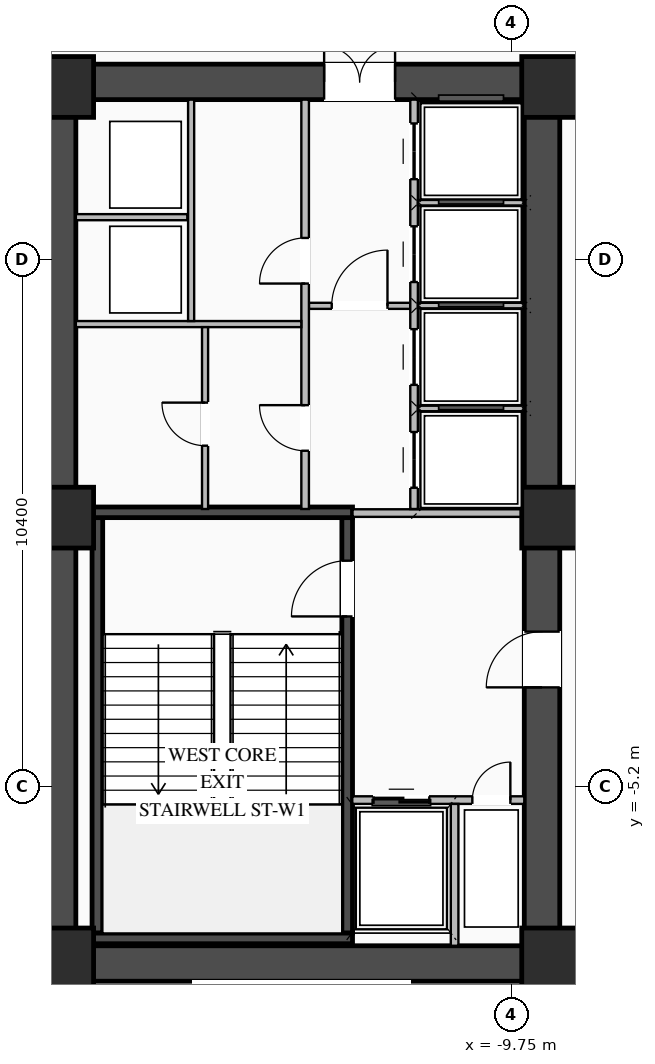
"""IFC4 building model, lengths in metres.
Left out: names, types, materials, properties, quantities, classifications, styles, units other than length and angle.
Written with IfcOpenShell. Run it as: python <this file> out.ifc"""

import sys

from ifc_helpers import new_model, si_unit, direction, frame, frame_2d, origin, origin_2d, place, context, subcontext, project, spatial, rectangle, extrude, element, fill, save


model = new_model("IFC4")
c1 = context("Model", 3, precision=1e-05, world=origin(), true_north=direction((0.0, 1.0)))
c2 = subcontext(c1, "Body", "Model", "MODEL_VIEW")
j1 = project(units=[si_unit("LENGTHUNIT", "METRE"), si_unit("PLANEANGLEUNIT", "RADIAN")], contexts=[c1])
p1 = place(None, origin())
s1 = spatial("IfcSite", under=j1, at=p1, CompositionType="ELEMENT")
p2 = place(p1, origin())
s2 = spatial("IfcBuilding", under=s1, at=p2, CompositionType="ELEMENT")
p3 = place(p2, frame((0.0, 0.0, -4.8)))
s3 = spatial("IfcBuildingStorey", under=s2, at=p3, CompositionType="ELEMENT", Elevation=-4.8)
p4 = place(p3, frame((-19.05, -8.7, 0.0), z_axis=(0.0, 0.0, 1.0), x_axis=(1.0, 0.0, 0.0)))
e1 = element("IfcWall", 1, at=p4, inside=s3, PredefinedType="SHEAR", context=c2, shape_type="SweptSolid", body=[
    extrude(rectangle(XDim=10.25, YDim=0.7, at=frame_2d((5.125, 0.0))), origin(), (0.0, 0.0, 1.0), 4.45),
])
p5 = place(p3, frame((-19.05, 8.7, 0.0), z_axis=(0.0, 0.0, 1.0), x_axis=(1.0, 0.0, 0.0)))
e2 = element("IfcWall", 2, at=p5, inside=s3, PredefinedType="SHEAR", context=c2, shape_type="SweptSolid", body=[
    extrude(rectangle(XDim=10.25, YDim=0.7, at=frame_2d((5.125, 0.0))), origin(), (0.0, 0.0, 1.0), 4.45),
])
p6 = place(p5, frame((5.6, 0.0, 0.0)))
e3 = element("IfcOpeningElement", 3, at=p6, cuts=e2, PredefinedType="OPENING", context=c2, shape_type="SweptSolid", body=[
    extrude(rectangle(XDim=1.4, YDim=2.05, at=frame_2d((0.7, 1.025))), frame((0.0, 0.36, 0.0), z_axis=(0.0, -1.0, 0.0), x_axis=(1.0, 0.0, 0.0)), (0.0, 0.0, 1.0), 0.72),
])
p7 = place(p3, frame((-18.7, -8.35, 0.0), z_axis=(0.0, 0.0, 1.0), x_axis=(0.0, 1.0, 0.0)))
e4 = element("IfcWall", 4, at=p7, inside=s3, PredefinedType="SHEAR", context=c2, shape_type="SweptSolid", body=[
    extrude(rectangle(XDim=16.7, YDim=0.7, at=frame_2d((8.35, 0.0))), origin(), (0.0, 0.0, 1.0), 4.45),
])
p8 = place(p3, frame((-9.15, -8.35, 0.0), z_axis=(0.0, 0.0, 1.0), x_axis=(0.0, 1.0, 0.0)))
e5 = element("IfcWall", 5, at=p8, inside=s3, PredefinedType="SHEAR", context=c2, shape_type="SweptSolid", body=[
    extrude(rectangle(XDim=16.7, YDim=0.7, at=frame_2d((8.35, 0.0))), origin(), (0.0, 0.0, 1.0), 4.45),
])
p9 = place(p8, frame((5.1, 0.0, 0.0)))
e6 = element("IfcOpeningElement", 6, at=p9, cuts=e5, PredefinedType="OPENING", context=c2, shape_type="SweptSolid", body=[
    extrude(rectangle(XDim=1.1, YDim=2.08, at=frame_2d((0.55, 1.04))), frame((0.0, 0.36, 0.0), z_axis=(0.0, -1.0, 0.0), x_axis=(1.0, 0.0, 0.0)), (0.0, 0.0, 1.0), 0.72),
])
p10 = place(p3, frame((-12.995, -8.1, 0.0), z_axis=(0.0, 0.0, 1.0), x_axis=(0.0, 1.0, 0.0)))
e7 = element("IfcWall", 7, at=p10, inside=s3, PredefinedType="SHEAR", context=c2, shape_type="SweptSolid", body=[
    extrude(rectangle(XDim=8.2, YDim=0.21, at=frame_2d((4.1, 0.0))), origin(), (0.0, 0.0, 1.0), 4.45),
])
p11 = place(p10, frame((6.25, 0.0, 0.0)))
e8 = element("IfcOpeningElement", 8, at=p11, cuts=e7, PredefinedType="OPENING", context=c2, shape_type="SweptSolid", body=[
    extrude(rectangle(XDim=1.1, YDim=2.15, at=frame_2d((0.55, 1.075))), frame((0.0, 0.115, 0.0), z_axis=(0.0, -1.0, 0.0), x_axis=(1.0, 0.0, 0.0)), (0.0, 0.0, 1.0), 0.23),
])
p12 = place(p3, frame((-17.925, -8.1, 0.0), z_axis=(0.0, 0.0, 1.0), x_axis=(0.0, 1.0, 0.0)))
e9 = element("IfcWall", 9, at=p12, inside=s3, PredefinedType="SHEAR", context=c2, shape_type="SweptSolid", body=[
    extrude(rectangle(XDim=8.2, YDim=0.21, at=frame_2d((4.1, 0.0))), origin(), (0.0, 0.0, 1.0), 4.45),
])
for number, where, z_axis, x_axis in (
    (10, (-18.03, -8.205, 0.0), (0.0, 0.0, 1.0), (1.0, 0.0, 0.0)),
    (11, (-12.89, 0.205, 0.0), (0.0, 0.0, 1.0), (-1.0, 0.0, 0.0)),
):
    element("IfcWall", number, at=place(p3, frame(where, z_axis=z_axis, x_axis=x_axis)), inside=s3, PredefinedType="SHEAR", context=c2, shape_type="SweptSolid", body=[
        extrude(rectangle(XDim=5.14, YDim=0.21, at=frame_2d((2.57, 0.0))), origin(), (0.0, 0.0, 1.0), 4.45),
    ])
for number, where, z_axis, x_axis in (
    (12, (-8.95, -8.6, 0.0), (0.0, 0.0, 1.0), (1.0, 0.0, 0.0)),
    (13, (-8.95, 0.1, 0.0), (0.0, 0.0, 1.0), (1.0, 0.0, 0.0)),
    (14, (-8.95, 8.6, 0.0), (0.0, 0.0, 1.0), (1.0, 0.0, 0.0)),
    (15, (-18.6, -8.6, 0.0), (0.0, 0.0, 1.0), (1.0, 0.0, 0.0)),
    (16, (-18.6, 0.1, 0.0), (0.0, 0.0, 1.0), (1.0, 0.0, 0.0)),
    (17, (-18.6, 8.6, 0.0), (0.0, 0.0, 1.0), (1.0, 0.0, 0.0)),
):
    element("IfcColumn", number, at=place(p3, frame(where, z_axis=z_axis, x_axis=x_axis)), inside=s3, PredefinedType="COLUMN", context=c2, shape_type="SweptSolid", body=[
        extrude(rectangle(XDim=1.2, YDim=1.2, at=origin_2d()), origin(), (0.0, 0.0, 1.0), 4.8),
    ])
p13 = place(p3, frame((-12.895, -5.475, 0.0), z_axis=(0.0, 0.0, 1.0), x_axis=(1.0, 0.0, 0.0)))
e18 = element("IfcWall", 18, at=p13, inside=s3, PredefinedType="STANDARD", context=c2, shape_type="SweptSolid", body=[
    extrude(rectangle(XDim=3.395, YDim=0.15, at=frame_2d((1.698, 0.0))), origin(), (0.0, 0.0, 1.0), 4.43),
])
p14 = place(p13, frame((0.42, 0.0, 0.0)))
e19 = element("IfcOpeningElement", 19, at=p14, cuts=e18, PredefinedType="OPENING", context=c2, shape_type="SweptSolid", body=[
    extrude(rectangle(XDim=1.1, YDim=2.15, at=frame_2d((0.55, 1.075))), frame((0.0, 0.085, 0.0), z_axis=(0.0, -1.0, 0.0), x_axis=(1.0, 0.0, 0.0)), (0.0, 0.0, 1.0), 0.17),
])
p15 = place(p13, frame((2.37, 0.0, 0.0)))
e20 = element("IfcOpeningElement", 20, at=p15, cuts=e18, PredefinedType="OPENING", context=c2, shape_type="SweptSolid", body=[
    extrude(rectangle(XDim=0.75, YDim=2.05, at=frame_2d((0.375, 1.025))), frame((0.0, 0.085, 0.0), z_axis=(0.0, -1.0, 0.0), x_axis=(1.0, 0.0, 0.0)), (0.0, 0.0, 1.0), 0.17),
])
p16 = place(p3, frame((-10.875, -8.35, 0.0), z_axis=(0.0, 0.0, 1.0), x_axis=(0.0, 1.0, 0.0)))
e21 = element("IfcWall", 21, at=p16, inside=s3, PredefinedType="STANDARD", context=c2, shape_type="SweptSolid", body=[
    extrude(rectangle(XDim=2.8, YDim=0.15, at=frame_2d((1.4, 0.0))), origin(), (0.0, 0.0, 1.0), 4.43),
])
p17 = place(p3, frame((-12.89, 0.19, 0.0), z_axis=(0.0, 0.0, 1.0), x_axis=(1.0, 0.0, 0.0)))
e22 = element("IfcWall", 22, at=p17, inside=s3, PredefinedType="STANDARD", context=c2, shape_type="SweptSolid", body=[
    extrude(rectangle(XDim=3.39, YDim=0.15, at=frame_2d((1.695, 0.0))), origin(), (0.0, 0.0, 1.0), 3.625),
])
p18 = place(p3, frame((-13.75, 4.28, 0.0), z_axis=(0.0, 0.0, 1.0), x_axis=(1.0, 0.0, 0.0)))
e23 = element("IfcWall", 23, at=p18, inside=s3, PredefinedType="STANDARD", context=c2, shape_type="SweptSolid", body=[
    extrude(rectangle(XDim=2.0, YDim=0.12, at=frame_2d((1.0, 0.0))), origin(), (0.0, 0.0, 1.0), 4.43),
])
p19 = place(p18, frame((0.45, 0.0, 0.0)))
e24 = element("IfcOpeningElement", 24, at=p19, cuts=e23, PredefinedType="OPENING", context=c2, shape_type="SweptSolid", body=[
    extrude(rectangle(XDim=1.1, YDim=2.1, at=frame_2d((0.55, 1.05))), frame((0.0, 0.07, 0.0), z_axis=(0.0, -1.0, 0.0), x_axis=(1.0, 0.0, 0.0)), (0.0, 0.0, 1.0), 0.14),
])
p20 = place(p3, frame((-11.675, 0.27, 0.0), z_axis=(0.0, 0.0, 1.0), x_axis=(0.0, 1.0, 0.0)))
e25 = element("IfcWall", 25, at=p20, inside=s3, PredefinedType="STANDARD", context=c2, shape_type="SweptSolid", body=[
    extrude(rectangle(XDim=8.08, YDim=0.15, at=frame_2d((4.04, 0.0))), origin(), (0.0, 0.0, 1.0), 4.43),
])
p21 = place(p20, frame((0.42, 0.0, 0.0)))
e26 = element("IfcOpeningElement", 26, at=p21, cuts=e25, PredefinedType="OPENING", context=c2, shape_type="SweptSolid", body=[
    extrude(rectangle(XDim=1.1, YDim=2.1, at=frame_2d((0.55, 1.05))), frame((0.0, 0.085, 0.0), z_axis=(0.0, -1.0, 0.0), x_axis=(1.0, 0.0, 0.0)), (0.0, 0.0, 1.0), 0.17),
])
p22 = place(p20, frame((2.45, 0.0, 0.0)))
e27 = element("IfcOpeningElement", 27, at=p22, cuts=e25, PredefinedType="OPENING", context=c2, shape_type="SweptSolid", body=[
    extrude(rectangle(XDim=1.1, YDim=2.1, at=frame_2d((0.55, 1.05))), frame((0.0, 0.085, 0.0), z_axis=(0.0, -1.0, 0.0), x_axis=(1.0, 0.0, 0.0)), (0.0, 0.0, 1.0), 0.17),
])
p23 = place(p20, frame((4.48, 0.0, 0.0)))
e28 = element("IfcOpeningElement", 28, at=p23, cuts=e25, PredefinedType="OPENING", context=c2, shape_type="SweptSolid", body=[
    extrude(rectangle(XDim=1.1, YDim=2.1, at=frame_2d((0.55, 1.05))), frame((0.0, 0.085, 0.0), z_axis=(0.0, -1.0, 0.0), x_axis=(1.0, 0.0, 0.0)), (0.0, 0.0, 1.0), 0.17),
])
p24 = place(p20, frame((6.51, 0.0, 0.0)))
e29 = element("IfcOpeningElement", 29, at=p24, cuts=e25, PredefinedType="OPENING", context=c2, shape_type="SweptSolid", body=[
    extrude(rectangle(XDim=1.1, YDim=2.1, at=frame_2d((0.55, 1.05))), frame((0.0, 0.085, 0.0), z_axis=(0.0, -1.0, 0.0), x_axis=(1.0, 0.0, 0.0)), (0.0, 0.0, 1.0), 0.17),
])
for number, where, z_axis, x_axis in (
    (30, (-11.6, 2.255, 0.0), (0.0, 0.0, 1.0), (1.0, 0.0, 0.0)),
    (31, (-11.6, 4.285, 0.0), (0.0, 0.0, 1.0), (1.0, 0.0, 0.0)),
    (32, (-11.6, 6.315, 0.0), (0.0, 0.0, 1.0), (1.0, 0.0, 0.0)),
):
    element("IfcWall", number, at=place(p3, frame(where, z_axis=z_axis, x_axis=x_axis)), inside=s3, PredefinedType="STANDARD", context=c2, shape_type="SweptSolid", body=[
        extrude(rectangle(XDim=2.1, YDim=0.11, at=frame_2d((1.05, 0.0))), origin(), (0.0, 0.0, 1.0), 4.43),
    ])
p25 = place(p3, frame((-13.825, 0.27, 0.0), z_axis=(0.0, 0.0, 1.0), x_axis=(0.0, 1.0, 0.0)))
e33 = element("IfcWall", 33, at=p25, inside=s3, PredefinedType="STANDARD", context=c2, shape_type="SweptSolid", body=[
    extrude(rectangle(XDim=8.08, YDim=0.15, at=frame_2d((4.04, 0.0))), origin(), (0.0, 0.0, 1.0), 4.43),
])
p26 = place(p25, frame((4.45, 0.0, 0.0)))
e34 = element("IfcOpeningElement", 34, at=p26, cuts=e33, PredefinedType="OPENING", context=c2, shape_type="SweptSolid", body=[
    extrude(rectangle(XDim=0.9, YDim=2.05, at=frame_2d((0.45, 1.025))), frame((0.0, 0.085, 0.0), z_axis=(0.0, -1.0, 0.0), x_axis=(1.0, 0.0, 0.0)), (0.0, 0.0, 1.0), 0.17),
])
p27 = place(p25, frame((1.15, 0.0, 0.0)))
e35 = element("IfcOpeningElement", 35, at=p27, cuts=e33, PredefinedType="OPENING", context=c2, shape_type="SweptSolid", body=[
    extrude(rectangle(XDim=0.9, YDim=2.05, at=frame_2d((0.45, 1.025))), frame((0.0, 0.085, 0.0), z_axis=(0.0, -1.0, 0.0), x_axis=(1.0, 0.0, 0.0)), (0.0, 0.0, 1.0), 0.17),
])
p28 = place(p3, frame((-18.35, 3.92, 0.0), z_axis=(0.0, 0.0, 1.0), x_axis=(1.0, 0.0, 0.0)))
e36 = element("IfcWall", 36, at=p28, inside=s3, PredefinedType="STANDARD", context=c2, shape_type="SweptSolid", body=[
    extrude(rectangle(XDim=4.45, YDim=0.12, at=frame_2d((2.225, 0.0))), origin(), (0.0, 0.0, 1.0), 4.43),
])
p29 = place(p3, frame((-18.35, 6.03, 0.0), z_axis=(0.0, 0.0, 1.0), x_axis=(1.0, 0.0, 0.0)))
e37 = element("IfcWall", 37, at=p29, inside=s3, PredefinedType="STANDARD", context=c2, shape_type="SweptSolid", body=[
    extrude(rectangle(XDim=2.2, YDim=0.12, at=frame_2d((1.1, 0.0))), origin(), (0.0, 0.0, 1.0), 4.43),
])
p30 = place(p3, frame((-16.075, 3.98, 0.0), z_axis=(0.0, 0.0, 1.0), x_axis=(0.0, 1.0, 0.0)))
e38 = element("IfcWall", 38, at=p30, inside=s3, PredefinedType="STANDARD", context=c2, shape_type="SweptSolid", body=[
    extrude(rectangle(XDim=4.37, YDim=0.12, at=frame_2d((2.185, 0.0))), origin(), (0.0, 0.0, 1.0), 4.43),
])
p31 = place(p3, frame((-15.8, 0.27, 0.0), z_axis=(0.0, 0.0, 1.0), x_axis=(0.0, 1.0, 0.0)))
e39 = element("IfcWall", 39, at=p31, inside=s3, PredefinedType="STANDARD", context=c2, shape_type="SweptSolid", body=[
    extrude(rectangle(XDim=3.59, YDim=0.12, at=frame_2d((1.795, 0.0))), origin(), (0.0, 0.0, 1.0), 4.43),
])
p32 = place(p31, frame((1.25, 0.0, 0.0)))
e40 = element("IfcOpeningElement", 40, at=p32, cuts=e39, PredefinedType="OPENING", context=c2, shape_type="SweptSolid", body=[
    extrude(rectangle(XDim=0.85, YDim=2.05, at=frame_2d((0.425, 1.025))), frame((0.0, 0.07, 0.0), z_axis=(0.0, -1.0, 0.0), x_axis=(1.0, 0.0, 0.0)), (0.0, 0.0, 1.0), 0.14),
])
p33 = place(p11, origin())
e41 = element("IfcDoor", 41, at=p33, inside=s3, OperationType="SINGLE_SWING_LEFT", PredefinedType="DOOR", context=c2, shape_type="SweptSolid", body=[
    extrude(rectangle(XDim=1.1, YDim=2.15, at=frame_2d((0.55, 1.075))), frame((0.0, 0.025, 0.0), z_axis=(0.0, -1.0, 0.0), x_axis=(1.0, 0.0, 0.0)), (0.0, 0.0, 1.0), 0.05),
])
fill(e8, e41)
p34 = place(p14, origin())
e42 = element("IfcDoor", 42, at=p34, inside=s3, OperationType="DOUBLE_DOOR_SLIDING", PredefinedType="DOOR", context=c2, shape_type="SweptSolid", body=[
    extrude(rectangle(XDim=1.1, YDim=2.15, at=frame_2d((0.55, 1.075))), frame((0.0, 0.025, 0.0), z_axis=(0.0, -1.0, 0.0), x_axis=(1.0, 0.0, 0.0)), (0.0, 0.0, 1.0), 0.05),
])
fill(e19, e42)
p35 = place(p15, origin())
e43 = element("IfcDoor", 43, at=p35, inside=s3, OperationType="SINGLE_SWING_RIGHT", PredefinedType="DOOR", context=c2, shape_type="SweptSolid", body=[
    extrude(rectangle(XDim=0.75, YDim=2.05, at=frame_2d((0.375, 1.025))), frame((0.0, 0.025, 0.0), z_axis=(0.0, -1.0, 0.0), x_axis=(1.0, 0.0, 0.0)), (0.0, 0.0, 1.0), 0.05),
])
fill(e20, e43)
p36 = place(p9, origin())
e44 = element("IfcDoor", 44, at=p36, inside=s3, OperationType="SINGLE_SWING_LEFT", PredefinedType="DOOR", context=c2, shape_type="SweptSolid", body=[
    extrude(rectangle(XDim=1.1, YDim=2.08, at=frame_2d((0.55, 1.04))), frame((0.0, 0.305, 0.0), z_axis=(0.0, -1.0, 0.0), x_axis=(1.0, 0.0, 0.0)), (0.0, 0.0, 1.0), 0.05),
])
fill(e6, e44)
p37 = place(p19, origin())
e45 = element("IfcDoor", 45, at=p37, inside=s3, OperationType="SINGLE_SWING_RIGHT", PredefinedType="DOOR", context=c2, shape_type="SweptSolid", body=[
    extrude(rectangle(XDim=1.1, YDim=2.1, at=frame_2d((0.55, 1.05))), frame((0.0, 0.025, 0.0), z_axis=(0.0, -1.0, 0.0), x_axis=(1.0, 0.0, 0.0)), (0.0, 0.0, 1.0), 0.05),
])
fill(e24, e45)
p38 = place(p6, origin())
e46 = element("IfcDoor", 46, at=p38, inside=s3, OperationType="DOUBLE_DOOR_SINGLE_SWING", PredefinedType="DOOR", context=c2, shape_type="SweptSolid", body=[
    extrude(rectangle(XDim=1.4, YDim=2.05, at=frame_2d((0.7, 1.025))), frame((0.0, 0.295, 0.0), z_axis=(0.0, -1.0, 0.0), x_axis=(1.0, 0.0, 0.0)), (0.0, 0.0, 1.0), 0.05),
])
fill(e3, e46)
p39 = place(p21, origin())
e47 = element("IfcDoor", 47, at=p39, inside=s3, OperationType="DOUBLE_DOOR_SLIDING", PredefinedType="DOOR", context=c2, shape_type="SweptSolid", body=[
    extrude(rectangle(XDim=1.1, YDim=2.1, at=frame_2d((0.55, 1.05))), frame((0.0, 0.025, 0.0), z_axis=(0.0, -1.0, 0.0), x_axis=(1.0, 0.0, 0.0)), (0.0, 0.0, 1.0), 0.05),
])
fill(e26, e47)
p40 = place(p22, origin())
e48 = element("IfcDoor", 48, at=p40, inside=s3, OperationType="DOUBLE_DOOR_SLIDING", PredefinedType="DOOR", context=c2, shape_type="SweptSolid", body=[
    extrude(rectangle(XDim=1.1, YDim=2.1, at=frame_2d((0.55, 1.05))), frame((0.0, 0.025, 0.0), z_axis=(0.0, -1.0, 0.0), x_axis=(1.0, 0.0, 0.0)), (0.0, 0.0, 1.0), 0.05),
])
fill(e27, e48)
p41 = place(p23, origin())
e49 = element("IfcDoor", 49, at=p41, inside=s3, OperationType="DOUBLE_DOOR_SLIDING", PredefinedType="DOOR", context=c2, shape_type="SweptSolid", body=[
    extrude(rectangle(XDim=1.1, YDim=2.1, at=frame_2d((0.55, 1.05))), frame((0.0, 0.025, 0.0), z_axis=(0.0, -1.0, 0.0), x_axis=(1.0, 0.0, 0.0)), (0.0, 0.0, 1.0), 0.05),
])
fill(e28, e49)
p42 = place(p24, origin())
e50 = element("IfcDoor", 50, at=p42, inside=s3, OperationType="DOUBLE_DOOR_SLIDING", PredefinedType="DOOR", context=c2, shape_type="SweptSolid", body=[
    extrude(rectangle(XDim=1.1, YDim=2.1, at=frame_2d((0.55, 1.05))), frame((0.0, 0.025, 0.0), z_axis=(0.0, -1.0, 0.0), x_axis=(1.0, 0.0, 0.0)), (0.0, 0.0, 1.0), 0.05),
])
fill(e29, e50)
p43 = place(p26, origin())
e51 = element("IfcDoor", 51, at=p43, inside=s3, OperationType="SINGLE_SWING_LEFT", PredefinedType="DOOR", context=c2, shape_type="SweptSolid", body=[
    extrude(rectangle(XDim=0.9, YDim=2.05, at=frame_2d((0.45, 1.025))), frame((0.0, 0.025, 0.0), z_axis=(0.0, -1.0, 0.0), x_axis=(1.0, 0.0, 0.0)), (0.0, 0.0, 1.0), 0.05),
])
fill(e34, e51)
p44 = place(p27, origin())
e52 = element("IfcDoor", 52, at=p44, inside=s3, OperationType="SINGLE_SWING_RIGHT", PredefinedType="DOOR", context=c2, shape_type="SweptSolid", body=[
    extrude(rectangle(XDim=0.9, YDim=2.05, at=frame_2d((0.45, 1.025))), frame((0.0, 0.025, 0.0), z_axis=(0.0, -1.0, 0.0), x_axis=(1.0, 0.0, 0.0)), (0.0, 0.0, 1.0), 0.05),
])
fill(e35, e52)
p45 = place(p32, origin())
e53 = element("IfcDoor", 53, at=p45, inside=s3, OperationType="SINGLE_SWING_RIGHT", PredefinedType="DOOR", context=c2, shape_type="SweptSolid", body=[
    extrude(rectangle(XDim=0.85, YDim=2.05, at=frame_2d((0.425, 1.025))), frame((0.0, 0.025, 0.0), z_axis=(0.0, -1.0, 0.0), x_axis=(1.0, 0.0, 0.0)), (0.0, 0.0, 1.0), 0.05),
])
fill(e40, e53)
save(model, sys.argv[1])
